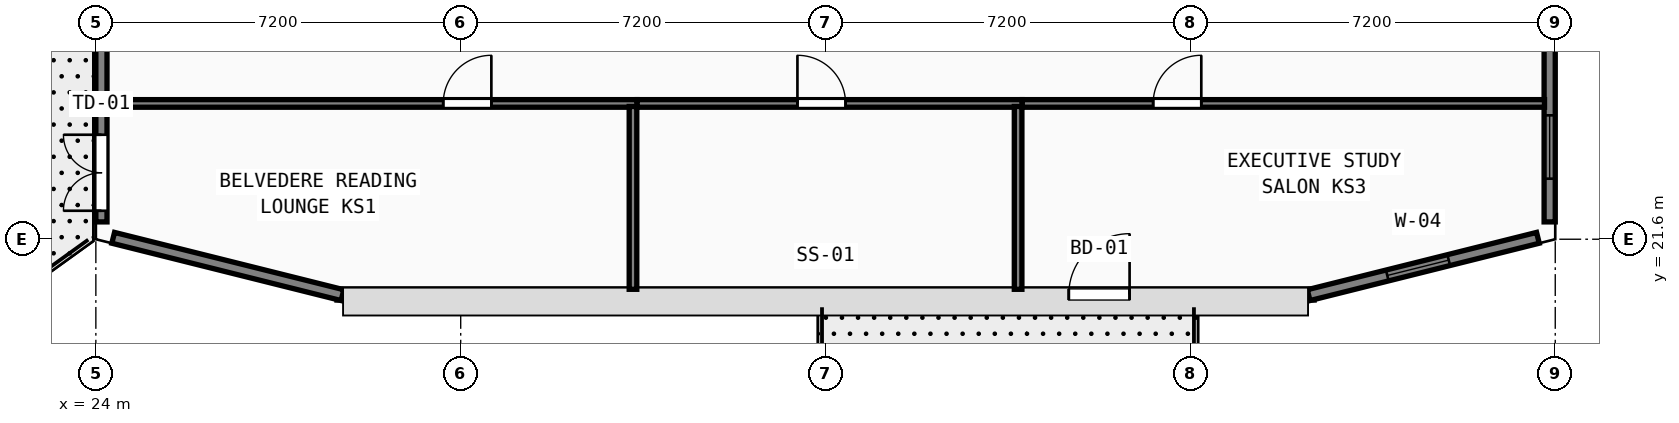
"""IFC4 building model, lengths in metres.
Left out: names, types, materials, properties, quantities, classifications, styles, units other than length and angle.
Written with IfcOpenShell. Run it as: python <this file> out.ifc"""

import sys

from ifc_helpers import new_model, si_unit, direction, frame, frame_2d, origin, origin_2d, place, context, subcontext, project, spatial, rectangle, hollow_rectangle, extrude, element, fill, save


model = new_model("IFC4")
c1 = context("Model", 3, precision=1e-05, world=origin(), true_north=direction((0.0, 1.0)))
c2 = subcontext(c1, "Body", "Model", "MODEL_VIEW")
j1 = project(units=[si_unit("LENGTHUNIT", "METRE"), si_unit("PLANEANGLEUNIT", "RADIAN")], contexts=[c1])
p1 = place(None, origin())
s1 = spatial("IfcSite", under=j1, at=p1, CompositionType="ELEMENT")
p2 = place(p1, origin())
s2 = spatial("IfcBuilding", under=s1, at=p2, CompositionType="ELEMENT")
p3 = place(p2, frame((0.0, 0.0, 282.2)))
s3 = spatial("IfcBuildingStorey", under=s2, at=p3, CompositionType="ELEMENT", Elevation=282.2)
for number, where, z_axis, x_axis in (
    (1, (24.0, 21.6, 0.0), (0.0, 0.0, 1.0), (1.0, 0.0, 0.0)),
    (2, (52.8, 21.6, 0.0), (0.0, 0.0, 1.0), (1.0, 0.0, 0.0)),
    (3, (31.2, 21.6, 0.0), (0.0, 0.0, 1.0), (1.0, 0.0, 0.0)),
    (4, (45.6, 21.6, 0.0), (0.0, 0.0, 1.0), (1.0, 0.0, 0.0)),
):
    element("IfcColumn", number, at=place(p3, frame(where, z_axis=z_axis, x_axis=x_axis)), inside=s3, PredefinedType="COLUMN", context=c2, shape_type="SweptSolid", body=[
        extrude(hollow_rectangle(XDim=0.7, YDim=0.7, WallThickness=0.026, at=origin_2d()), origin(), (0.0, 0.0, 1.0), 3.9),
    ])
p4 = place(p3, frame((38.4, 21.6, 0.0), z_axis=(0.0, 0.0, 1.0), x_axis=(1.0, 0.0, 0.0)))
e5 = element("IfcColumn", 5, at=p4, inside=s3, PredefinedType="COLUMN", context=c2, shape_type="SweptSolid", body=[
    extrude(hollow_rectangle(XDim=0.6, YDim=0.6, WallThickness=0.024, at=origin_2d()), origin(), (0.0, 0.0, 1.0), 3.9),
])
p5 = place(p3, frame((28.759, 20.51, 0.0), z_axis=(0.0, 0.0, 1.0), x_axis=(1.0, 0.0, 0.0)))
e6 = element("IfcWall", 6, at=p5, inside=s3, PredefinedType="SOLIDWALL", context=c2, shape_type="SweptSolid", body=[
    extrude(rectangle(XDim=19.283, YDim=0.22, at=frame_2d((9.642, 0.0))), origin(), (0.0, 0.0, 1.0), 3.72),
])
p6 = place(p5, frame((15.641, 0.0, 0.0), z_axis=(0.0, 0.0, 1.0), x_axis=(-1.0, 0.0, 0.0)))
e7 = element("IfcOpeningElement", 7, at=p6, cuts=e6, PredefinedType="OPENING", context=c2, shape_type="SweptSolid", body=[
    extrude(rectangle(XDim=1.2, YDim=2.15, at=frame_2d((0.6, 1.075))), frame((0.0, 0.12, 0.0), z_axis=(0.0, -1.0, 0.0), x_axis=(1.0, 0.0, 0.0)), (0.0, 0.0, 1.0), 0.24),
])
p7 = place(p3, frame((47.933, 20.497, 0.0), z_axis=(0.0, 0.0, 1.0), x_axis=(0.970136341762, 0.242560257242, 0.0)))
e8 = element("IfcWall", 8, at=p7, inside=s3, PredefinedType="SOLIDWALL", context=c2, shape_type="SweptSolid", body=[
    extrude(rectangle(XDim=4.664, YDim=0.22, at=frame_2d((2.332, 0.0))), origin(), (0.0, 0.0, 1.0), 3.365),
])
p8 = place(p7, frame((1.6, 0.0, 0.85)))
e9 = element("IfcOpeningElement", 9, at=p8, cuts=e8, PredefinedType="OPENING", context=c2, shape_type="SweptSolid", body=[
    extrude(rectangle(XDim=1.25, YDim=1.95, at=frame_2d((0.625, 0.975))), frame((0.0, 0.12, 0.0), z_axis=(0.0, -1.0, 0.0), x_axis=(1.0, 0.0, 0.0)), (0.0, 0.0, 1.0), 0.24),
])
p9 = place(p3, frame((52.69, 21.942, 0.0), z_axis=(0.0, 0.0, 1.0), x_axis=(0.0, 1.0, 0.0)))
e10 = element("IfcWall", 10, at=p9, inside=s3, PredefinedType="SOLIDWALL", context=c2, shape_type="SweptSolid", body=[
    extrude(rectangle(XDim=5.366, YDim=0.22, at=frame_2d((2.683, 0.0))), origin(), (0.0, 0.0, 1.0), 3.365),
])
p10 = place(p9, frame((0.853, 0.0, 0.85)))
e11 = element("IfcOpeningElement", 11, at=p10, cuts=e10, PredefinedType="OPENING", context=c2, shape_type="SweptSolid", body=[
    extrude(rectangle(XDim=1.25, YDim=1.95, at=frame_2d((0.625, 0.975))), frame((0.0, 0.12, 0.0), z_axis=(0.0, -1.0, 0.0), x_axis=(1.0, 0.0, 0.0)), (0.0, 0.0, 1.0), 0.24),
])
p11 = place(p3, frame((24.11, 27.308, 0.0), z_axis=(0.0, 0.0, 1.0), x_axis=(0.0, -1.0, 0.0)))
e12 = element("IfcWall", 12, at=p11, inside=s3, PredefinedType="SOLIDWALL", context=c2, shape_type="SweptSolid", body=[
    extrude(rectangle(XDim=5.366, YDim=0.22, at=frame_2d((2.683, 0.0))), origin(), (0.0, 0.0, 1.0), 3.365),
])
p12 = place(p11, frame((5.146, 0.0, 0.0), z_axis=(0.0, 0.0, 1.0), x_axis=(-1.0, 0.0, 0.0)))
e13 = element("IfcOpeningElement", 13, at=p12, cuts=e12, PredefinedType="OPENING", context=c2, shape_type="SweptSolid", body=[
    extrude(rectangle(XDim=1.5, YDim=2.2, at=frame_2d((0.75, 1.1))), frame((0.0, 0.12, 0.0), z_axis=(0.0, -1.0, 0.0), x_axis=(1.0, 0.0, 0.0)), (0.0, 0.0, 1.0), 0.24),
])
p13 = place(p3, frame((24.342, 21.628, 0.0), z_axis=(0.0, 0.0, 1.0), x_axis=(0.970136341762, -0.242560257242, 0.0)))
e14 = element("IfcWall", 14, at=p13, inside=s3, PredefinedType="SOLIDWALL", context=c2, shape_type="SweptSolid", body=[
    extrude(rectangle(XDim=4.664, YDim=0.22, at=frame_2d((2.332, 0.0))), origin(), (0.0, 0.0, 1.0), 3.365),
])
p14 = place(p3, frame((24.212, 24.28, 0.0), z_axis=(0.0, 0.0, 1.0), x_axis=(1.0, 0.0, 0.0)))
e15 = element("IfcWall", 15, at=p14, inside=s3, PredefinedType="PARTITIONING", context=c2, shape_type="SweptSolid", body=[
    extrude(rectangle(XDim=10.468, YDim=0.15, at=frame_2d((5.234, 0.0))), origin(), (0.0, 0.0, 1.0), 3.72),
])
p15 = place(p14, frame((7.593, 0.0, 0.0), z_axis=(0.0, 0.0, 1.0), x_axis=(-1.0, 0.0, 0.0)))
e16 = element("IfcOpeningElement", 16, at=p15, cuts=e15, PredefinedType="OPENING", context=c2, shape_type="SweptSolid", body=[
    extrude(rectangle(XDim=0.95, YDim=2.12, at=frame_2d((0.475, 1.06))), frame((0.0, 0.085, 0.0), z_axis=(0.0, -1.0, 0.0), x_axis=(1.0, 0.0, 0.0)), (0.0, 0.0, 1.0), 0.17),
])
p16 = place(p3, frame((34.6, 20.612, 0.0), z_axis=(0.0, 0.0, 1.0), x_axis=(0.0, 1.0, 0.0)))
e17 = element("IfcWall", 17, at=p16, inside=s3, PredefinedType="PARTITIONING", context=c2, shape_type="SweptSolid", body=[
    extrude(rectangle(XDim=3.608, YDim=0.15, at=frame_2d((1.804, 0.0))), origin(), (0.0, 0.0, 1.0), 3.72),
])
p17 = place(p3, frame((34.682, 24.28, 0.0), z_axis=(0.0, 0.0, 1.0), x_axis=(1.0, 0.0, 0.0)))
e18 = element("IfcWall", 18, at=p17, inside=s3, PredefinedType="PARTITIONING", context=c2, shape_type="SweptSolid", body=[
    extrude(rectangle(XDim=7.598, YDim=0.15, at=frame_2d((3.799, 0.0))), origin(), (0.0, 0.0, 1.0), 3.72),
])
p18 = place(p17, frame((4.113, 0.0, 0.0), z_axis=(0.0, 0.0, 1.0), x_axis=(-1.0, 0.0, 0.0)))
e19 = element("IfcOpeningElement", 19, at=p18, cuts=e18, PredefinedType="OPENING", context=c2, shape_type="SweptSolid", body=[
    extrude(rectangle(XDim=0.95, YDim=2.12, at=frame_2d((0.475, 1.06))), frame((0.0, 0.085, 0.0), z_axis=(0.0, -1.0, 0.0), x_axis=(1.0, 0.0, 0.0)), (0.0, 0.0, 1.0), 0.17),
])
p19 = place(p3, frame((42.2, 20.612, 0.0), z_axis=(0.0, 0.0, 1.0), x_axis=(0.0, 1.0, 0.0)))
e20 = element("IfcWall", 20, at=p19, inside=s3, PredefinedType="PARTITIONING", context=c2, shape_type="SweptSolid", body=[
    extrude(rectangle(XDim=3.608, YDim=0.15, at=frame_2d((1.804, 0.0))), origin(), (0.0, 0.0, 1.0), 3.72),
])
p20 = place(p3, frame((42.282, 24.28, 0.0), z_axis=(0.0, 0.0, 1.0), x_axis=(1.0, 0.0, 0.0)))
e21 = element("IfcWall", 21, at=p20, inside=s3, PredefinedType="PARTITIONING", context=c2, shape_type="SweptSolid", body=[
    extrude(rectangle(XDim=10.306, YDim=0.15, at=frame_2d((5.153, 0.0))), origin(), (0.0, 0.0, 1.0), 3.72),
])
p21 = place(p20, frame((3.533, 0.0, 0.0), z_axis=(0.0, 0.0, 1.0), x_axis=(-1.0, 0.0, 0.0)))
e22 = element("IfcOpeningElement", 22, at=p21, cuts=e21, PredefinedType="OPENING", context=c2, shape_type="SweptSolid", body=[
    extrude(rectangle(XDim=0.95, YDim=2.12, at=frame_2d((0.475, 1.06))), frame((0.0, 0.085, 0.0), z_axis=(0.0, -1.0, 0.0), x_axis=(1.0, 0.0, 0.0)), (0.0, 0.0, 1.0), 0.17),
])
p22 = place(p8, origin())
e23 = element("IfcWindow", 23, at=p22, inside=s3, PartitioningType="SINGLE_PANEL", PredefinedType="WINDOW", context=c2, shape_type="SweptSolid", body=[
    extrude(rectangle(XDim=1.25, YDim=1.95, at=frame_2d((0.625, 0.975))), frame((0.0, 0.03, 0.0), z_axis=(0.0, -1.0, 0.0), x_axis=(1.0, 0.0, 0.0)), (0.0, 0.0, 1.0), 0.06),
])
fill(e9, e23)
p23 = place(p10, origin())
e24 = element("IfcWindow", 24, at=p23, inside=s3, PartitioningType="SINGLE_PANEL", PredefinedType="WINDOW", context=c2, shape_type="SweptSolid", body=[
    extrude(rectangle(XDim=1.25, YDim=1.95, at=frame_2d((0.625, 0.975))), frame((0.0, 0.03, 0.0), z_axis=(0.0, -1.0, 0.0), x_axis=(1.0, 0.0, 0.0)), (0.0, 0.0, 1.0), 0.06),
])
fill(e11, e24)
p24 = place(p12, origin())
e25 = element("IfcDoor", 25, at=p24, inside=s3, OperationType="DOUBLE_DOOR_SINGLE_SWING", PredefinedType="DOOR", context=c2, shape_type="SweptSolid", body=[
    extrude(rectangle(XDim=1.5, YDim=2.2, at=frame_2d((0.75, 1.1))), frame((0.0, 0.025, 0.0), z_axis=(0.0, -1.0, 0.0), x_axis=(1.0, 0.0, 0.0)), (0.0, 0.0, 1.0), 0.05),
])
fill(e13, e25)
p25 = place(p6, origin())
e26 = element("IfcDoor", 26, at=p25, inside=s3, OperationType="SINGLE_SWING_LEFT", PredefinedType="DOOR", context=c2, shape_type="SweptSolid", body=[
    extrude(rectangle(XDim=1.2, YDim=2.15, at=frame_2d((0.6, 1.075))), frame((0.0, 0.025, 0.0), z_axis=(0.0, -1.0, 0.0), x_axis=(1.0, 0.0, 0.0)), (0.0, 0.0, 1.0), 0.05),
])
fill(e7, e26)
p26 = place(p15, origin())
e27 = element("IfcDoor", 27, at=p26, inside=s3, OperationType="SINGLE_SWING_LEFT", PredefinedType="DOOR", context=c2, shape_type="SweptSolid", body=[
    extrude(rectangle(XDim=0.95, YDim=2.12, at=frame_2d((0.475, 1.06))), frame((0.0, 0.025, 0.0), z_axis=(0.0, -1.0, 0.0), x_axis=(1.0, 0.0, 0.0)), (0.0, 0.0, 1.0), 0.05),
])
fill(e16, e27)
p27 = place(p18, origin())
e28 = element("IfcDoor", 28, at=p27, inside=s3, OperationType="SINGLE_SWING_RIGHT", PredefinedType="DOOR", context=c2, shape_type="SweptSolid", body=[
    extrude(rectangle(XDim=0.95, YDim=2.12, at=frame_2d((0.475, 1.06))), frame((0.0, 0.025, 0.0), z_axis=(0.0, -1.0, 0.0), x_axis=(1.0, 0.0, 0.0)), (0.0, 0.0, 1.0), 0.05),
])
fill(e19, e28)
p28 = place(p21, origin())
e29 = element("IfcDoor", 29, at=p28, inside=s3, OperationType="SINGLE_SWING_LEFT", PredefinedType="DOOR", context=c2, shape_type="SweptSolid", body=[
    extrude(rectangle(XDim=0.95, YDim=2.12, at=frame_2d((0.475, 1.06))), frame((0.0, 0.025, 0.0), z_axis=(0.0, -1.0, 0.0), x_axis=(1.0, 0.0, 0.0)), (0.0, 0.0, 1.0), 0.05),
])
fill(e22, e29)
save(model, sys.argv[1])
